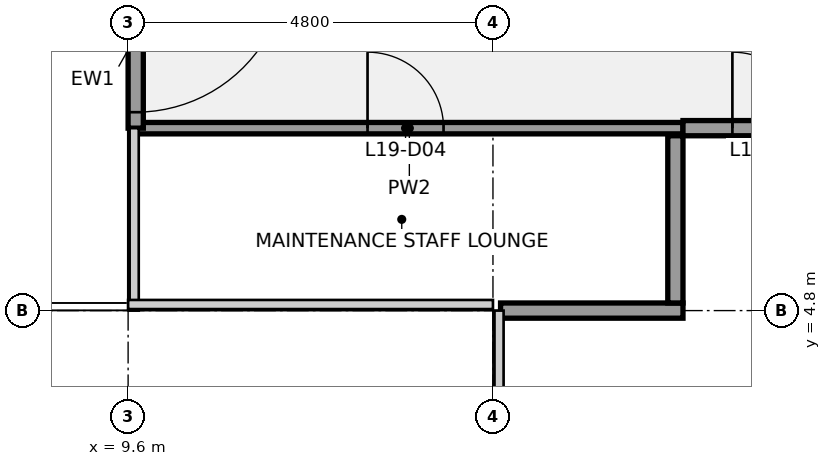
"""IFC4 building model, lengths in metres.
Left out: names, types, materials, properties, quantities, classifications, styles, units other than length and angle.
Written with IfcOpenShell. Run it as: python <this file> out.ifc"""

import sys

from ifc_helpers import new_model, si_unit, direction, frame, frame_2d, origin, place, context, subcontext, project, spatial, rectangle, extrude, element, fill, save


model = new_model("IFC4")
c1 = context("Model", 3, precision=1e-05, world=origin(), true_north=direction((0.0, 1.0)))
c2 = subcontext(c1, "Body", "Model", "MODEL_VIEW")
j1 = project(units=[si_unit("LENGTHUNIT", "METRE"), si_unit("PLANEANGLEUNIT", "RADIAN")], contexts=[c1])
p1 = place(None, origin())
s1 = spatial("IfcSite", under=j1, at=p1, CompositionType="ELEMENT")
p2 = place(p1, origin())
s2 = spatial("IfcBuilding", under=s1, at=p2, CompositionType="ELEMENT")
p3 = place(p2, frame((0.0, 0.0, 87.0)))
s3 = spatial("IfcBuildingStorey", under=s2, at=p3, CompositionType="ELEMENT", Elevation=87.0)
p4 = place(p3, frame((14.5, 4.8, 0.0), z_axis=(0.0, 0.0, 1.0), x_axis=(1.0, 0.0, 0.0)))
e1 = element("IfcWall", 1, at=p4, inside=s3, PredefinedType="PARTITIONING", context=c2, shape_type="SweptSolid", body=[
    extrude(rectangle(XDim=2.4, YDim=0.2, at=frame_2d((1.2, 0.0))), origin(), (0.0, 0.0, 1.0), 2.993),
])
p5 = place(p3, frame((9.7, 7.2, 0.0), z_axis=(0.0, 0.0, 1.0), x_axis=(1.0, 0.0, 0.0)))
e2 = element("IfcWall", 2, at=p5, inside=s3, PredefinedType="PARTITIONING", context=c2, shape_type="SweptSolid", body=[
    extrude(rectangle(XDim=7.2, YDim=0.15, at=frame_2d((3.6, 0.0))), origin(), (0.0, 0.0, 1.0), 2.993),
])
p6 = place(p5, frame((3.05, 0.0, 0.0)))
e3 = element("IfcOpeningElement", 3, at=p6, cuts=e2, PredefinedType="OPENING", context=c2, shape_type="SweptSolid", body=[
    extrude(rectangle(XDim=1.0, YDim=2.1, at=frame_2d((0.5, 1.05))), frame((0.0, 0.085, 0.0), z_axis=(0.0, -1.0, 0.0), x_axis=(1.0, 0.0, 0.0)), (0.0, 0.0, 1.0), 0.17),
])
p7 = place(p3, frame((16.9, 7.2, 0.0), z_axis=(0.0, 0.0, 1.0), x_axis=(1.0, 0.0, 0.0)))
e4 = element("IfcWall", 4, at=p7, inside=s3, PredefinedType="PARTITIONING", context=c2, shape_type="SweptSolid", body=[
    extrude(rectangle(XDim=2.4, YDim=0.2, at=frame_2d((1.2, 0.0))), origin(), (0.0, 0.0, 1.0), 2.993),
])
p8 = place(p7, frame((0.65, 0.0, 0.0)))
e5 = element("IfcOpeningElement", 5, at=p8, cuts=e4, PredefinedType="OPENING", context=c2, shape_type="SweptSolid", body=[
    extrude(rectangle(XDim=1.0, YDim=2.1, at=frame_2d((0.5, 1.05))), frame((0.0, 0.11, 0.0), z_axis=(0.0, -1.0, 0.0), x_axis=(1.0, 0.0, 0.0)), (0.0, 0.0, 1.0), 0.22),
])
p9 = place(p3, frame((16.8, 4.9, 0.0), z_axis=(0.0, 0.0, 1.0), x_axis=(0.0, 1.0, 0.0)))
e6 = element("IfcWall", 6, at=p9, inside=s3, PredefinedType="PARTITIONING", context=c2, shape_type="SweptSolid", body=[
    extrude(rectangle(XDim=2.2, YDim=0.2, at=frame_2d((1.1, 0.0))), origin(), (0.0, 0.0, 1.0), 2.993),
])
p10 = place(p3, frame((9.7, 9.61, 0.0), z_axis=(0.0, 0.0, 1.0), x_axis=(0.0, -1.0, 0.0)))
e7 = element("IfcWall", 7, at=p10, inside=s3, PredefinedType="SOLIDWALL", context=c2, shape_type="SweptSolid", body=[
    extrude(rectangle(XDim=2.41, YDim=0.2, at=frame_2d((1.205, 0.0))), origin(), (0.0, 0.0, 1.0), 3.196),
])
p11 = place(p10, frame((0.2, 0.0, 0.0)))
e8 = element("IfcOpeningElement", 8, at=p11, cuts=e7, PredefinedType="OPENING", context=c2, shape_type="SweptSolid", body=[
    extrude(rectangle(XDim=2.0, YDim=2.1, at=frame_2d((1.0, 1.05))), frame((0.0, 0.11, 0.0), z_axis=(0.0, -1.0, 0.0), x_axis=(1.0, 0.0, 0.0)), (0.0, 0.0, 1.0), 0.22),
])
p12 = place(p6, origin())
e9 = element("IfcDoor", 9, at=p12, inside=s3, OperationType="SINGLE_SWING_LEFT", PredefinedType="DOOR", context=c2, shape_type="SweptSolid", body=[
    extrude(rectangle(XDim=1.0, YDim=2.1, at=frame_2d((0.5, 1.05))), frame((0.0, 0.025, 0.0), z_axis=(0.0, -1.0, 0.0), x_axis=(1.0, 0.0, 0.0)), (0.0, 0.0, 1.0), 0.05),
])
fill(e3, e9)
p13 = place(p8, origin())
e10 = element("IfcDoor", 10, at=p13, inside=s3, OperationType="SINGLE_SWING_LEFT", PredefinedType="DOOR", context=c2, shape_type="SweptSolid", body=[
    extrude(rectangle(XDim=1.0, YDim=2.1, at=frame_2d((0.5, 1.05))), frame((0.0, 0.025, 0.0), z_axis=(0.0, -1.0, 0.0), x_axis=(1.0, 0.0, 0.0)), (0.0, 0.0, 1.0), 0.05),
])
fill(e5, e10)
p14 = place(p11, origin())
e11 = element("IfcDoor", 11, at=p14, inside=s3, OperationType="SINGLE_SWING_LEFT", PredefinedType="DOOR", context=c2, shape_type="SweptSolid", body=[
    extrude(rectangle(XDim=2.0, YDim=2.1, at=frame_2d((1.0, 1.05))), frame((0.0, 0.025, 0.0), z_axis=(0.0, -1.0, 0.0), x_axis=(1.0, 0.0, 0.0)), (0.0, 0.0, 1.0), 0.05),
])
fill(e8, e11)
save(model, sys.argv[1])
